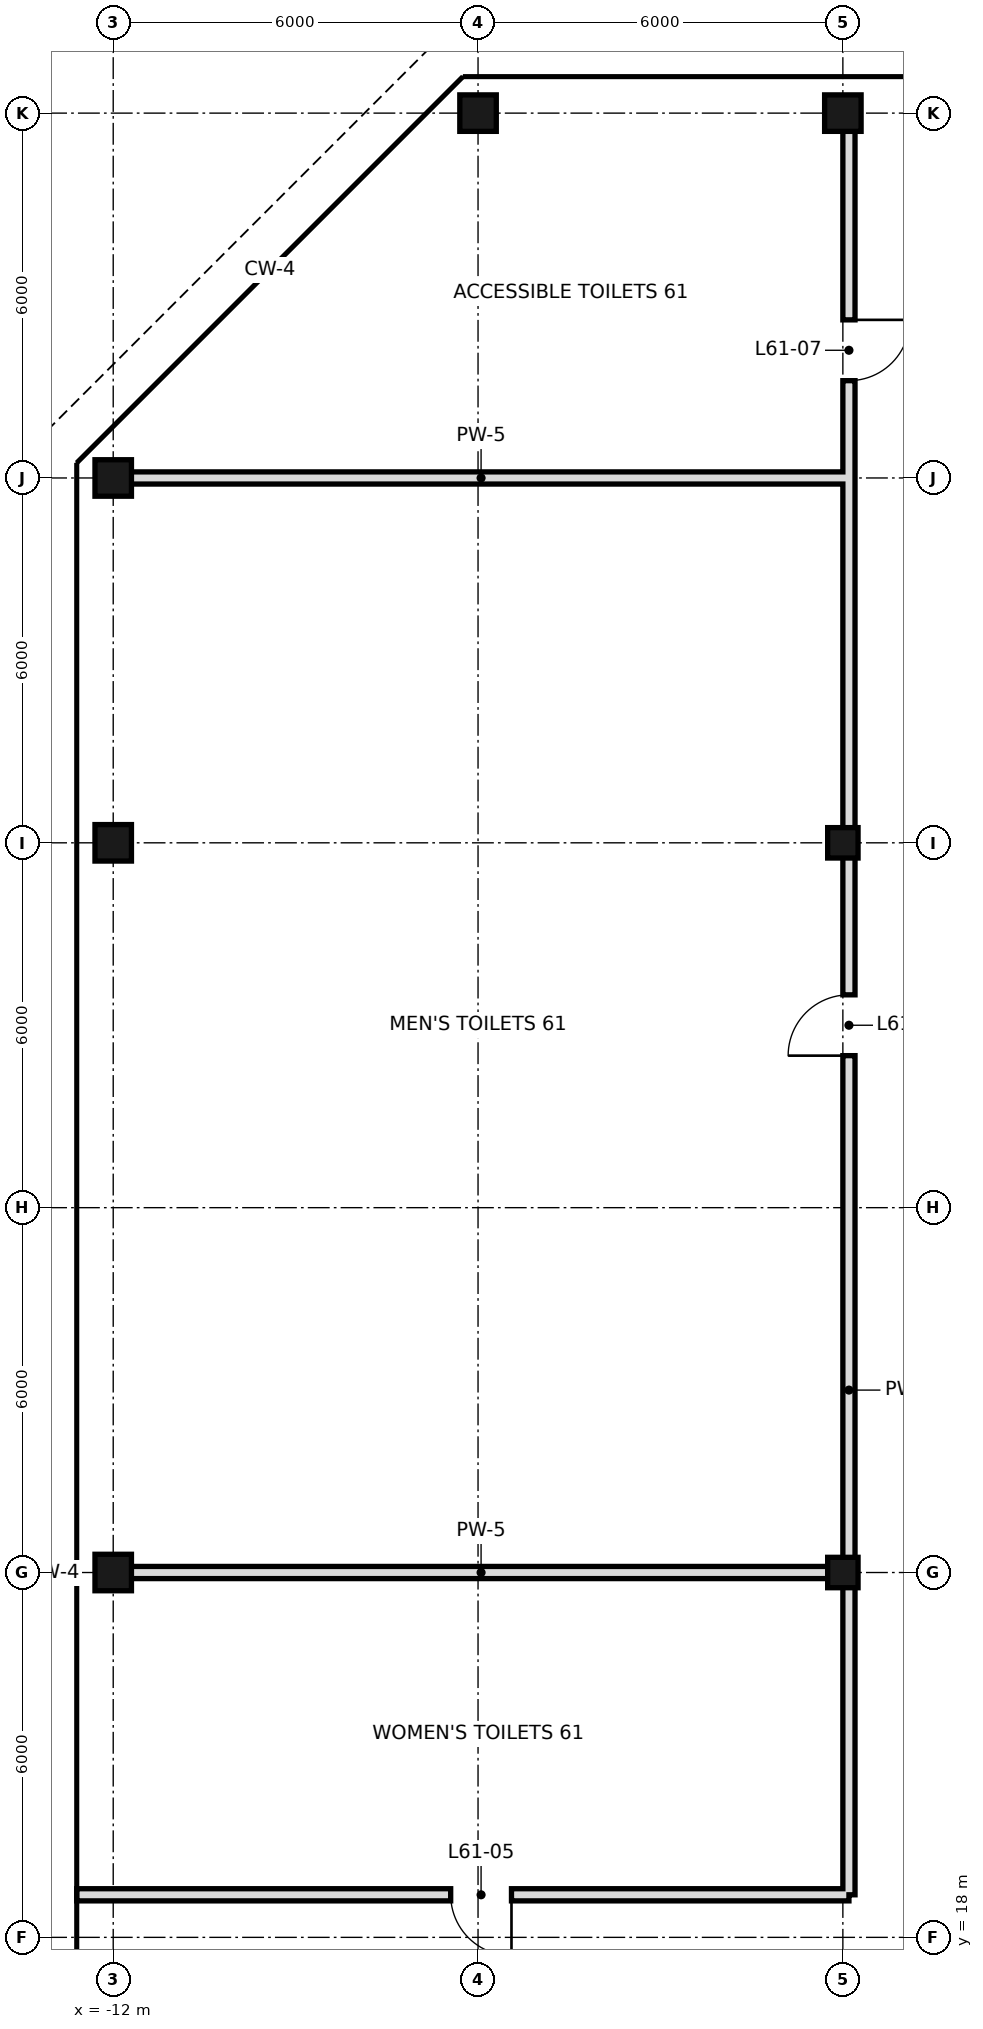
"""IFC4 building model, lengths in metres.
Left out: names, types, materials, properties, quantities, classifications, styles, units other than length and angle.
Written with IfcOpenShell. Run it as: python <this file> out.ifc"""

import sys

from ifc_helpers import new_model, si_unit, direction, frame, frame_2d, origin, origin_2d, place, context, subcontext, project, spatial, rectangle, hollow_rectangle, extrude, element, fill, save


model = new_model("IFC4")
c1 = context("Model", 3, precision=1e-05, world=origin(), true_north=direction((0.0, 1.0)))
c2 = subcontext(c1, "Body", "Model", "MODEL_VIEW")
j1 = project(units=[si_unit("LENGTHUNIT", "METRE"), si_unit("PLANEANGLEUNIT", "RADIAN")], contexts=[c1])
p1 = place(None, origin())
s1 = spatial("IfcSite", under=j1, at=p1, CompositionType="ELEMENT")
p2 = place(p1, origin())
s2 = spatial("IfcBuilding", under=s1, at=p2, CompositionType="ELEMENT")
p3 = place(p2, frame((0.0, 0.0, 257.6)))
s3 = spatial("IfcBuildingStorey", under=s2, at=p3, CompositionType="ELEMENT", Elevation=257.6)
for number, where, z_axis, x_axis in (
    (1, (-12.0, 24.0, 0.0), (0.0, 0.0, 1.0), (1.0, 0.0, 0.0)),
    (2, (-12.0, 36.0, 0.0), (0.0, 0.0, 1.0), (1.0, 0.0, 0.0)),
    (3, (-12.0, 42.0, 0.0), (0.0, 0.0, 1.0), (1.0, 0.0, 0.0)),
    (4, (-6.0, 48.0, 0.0), (0.0, 0.0, 1.0), (1.0, 0.0, 0.0)),
):
    element("IfcColumn", number, at=place(p3, frame(where, z_axis=z_axis, x_axis=x_axis)), inside=s3, PredefinedType="COLUMN", context=c2, shape_type="SweptSolid", body=[
        extrude(hollow_rectangle(XDim=0.6, YDim=0.6, WallThickness=0.028, at=origin_2d()), origin(), (0.0, 0.0, 1.0), 5.4),
    ])
for number, where, z_axis, x_axis in (
    (5, (0.0, 24.0, 0.0), (0.0, 0.0, 1.0), (1.0, 0.0, 0.0)),
    (6, (0.0, 36.0, 0.0), (0.0, 0.0, 1.0), (1.0, 0.0, 0.0)),
):
    element("IfcColumn", number, at=place(p3, frame(where, z_axis=z_axis, x_axis=x_axis)), inside=s3, PredefinedType="COLUMN", context=c2, shape_type="SweptSolid", body=[
        extrude(hollow_rectangle(XDim=0.5, YDim=0.5, WallThickness=0.025, at=origin_2d()), origin(), (0.0, 0.0, 1.0), 5.4),
    ])
p4 = place(p3, frame((0.0, 48.0, 0.0), z_axis=(0.0, 0.0, 1.0), x_axis=(1.0, 0.0, 0.0)))
e7 = element("IfcColumn", 7, at=p4, inside=s3, PredefinedType="COLUMN", context=c2, shape_type="SweptSolid", body=[
    extrude(hollow_rectangle(XDim=0.6, YDim=0.6, WallThickness=0.028, at=origin_2d()), origin(), (0.0, 0.0, 1.0), 5.4),
])
p5 = place(p3, frame((0.1, 18.7, 0.0), z_axis=(0.0, 0.0, 1.0), x_axis=(0.0, 1.0, 0.0)))
e8 = element("IfcWall", 8, at=p5, inside=s3, PredefinedType="SOLIDWALL", context=c2, shape_type="SweptSolid", body=[
    extrude(rectangle(XDim=29.3, YDim=0.2, at=frame_2d((14.65, 0.0))), origin(), (0.0, 0.0, 1.0), 4.52),
])
p6 = place(p5, frame((13.8, 0.0, 0.0)))
e9 = element("IfcOpeningElement", 9, at=p6, cuts=e8, PredefinedType="OPENING", context=c2, shape_type="SweptSolid", body=[
    extrude(rectangle(XDim=1.0, YDim=2.4, at=frame_2d((0.5, 1.2))), frame((0.0, 0.11, 0.0), z_axis=(0.0, -1.0, 0.0), x_axis=(1.0, 0.0, 0.0)), (0.0, 0.0, 1.0), 0.22),
])
p7 = place(p5, frame((24.9, 0.0, 0.0)))
e10 = element("IfcOpeningElement", 10, at=p7, cuts=e8, PredefinedType="OPENING", context=c2, shape_type="SweptSolid", body=[
    extrude(rectangle(XDim=1.0, YDim=2.4, at=frame_2d((0.5, 1.2))), frame((0.0, 0.11, 0.0), z_axis=(0.0, -1.0, 0.0), x_axis=(1.0, 0.0, 0.0)), (0.0, 0.0, 1.0), 0.22),
])
p8 = place(p3, frame((-12.6, 18.7, 0.0), z_axis=(0.0, 0.0, 1.0), x_axis=(1.0, 0.0, 0.0)))
e11 = element("IfcWall", 11, at=p8, inside=s3, PredefinedType="SOLIDWALL", context=c2, shape_type="SweptSolid", body=[
    extrude(rectangle(XDim=12.7, YDim=0.2, at=frame_2d((6.35, 0.0))), origin(), (0.0, 0.0, 1.0), 4.52),
])
p9 = place(p8, frame((6.15, 0.0, 0.0)))
e12 = element("IfcOpeningElement", 12, at=p9, cuts=e11, PredefinedType="OPENING", context=c2, shape_type="SweptSolid", body=[
    extrude(rectangle(XDim=1.0, YDim=2.4, at=frame_2d((0.5, 1.2))), frame((0.0, 0.11, 0.0), z_axis=(0.0, -1.0, 0.0), x_axis=(1.0, 0.0, 0.0)), (0.0, 0.0, 1.0), 0.22),
])
for number, where, z_axis, x_axis in (
    (13, (-12.0, 24.0, 0.0), (0.0, 0.0, 1.0), (1.0, 0.0, 0.0)),
    (14, (-12.0, 42.0, 0.0), (0.0, 0.0, 1.0), (1.0, 0.0, 0.0)),
):
    element("IfcWall", number, at=place(p3, frame(where, z_axis=z_axis, x_axis=x_axis)), inside=s3, PredefinedType="SOLIDWALL", context=c2, shape_type="SweptSolid", body=[
        extrude(rectangle(XDim=12.1, YDim=0.2, at=frame_2d((6.05, 0.0))), origin(), (0.0, 0.0, 1.0), 4.52),
    ])
p10 = place(p9, origin())
e15 = element("IfcDoor", 15, at=p10, inside=s3, OperationType="SINGLE_SWING_RIGHT", PredefinedType="DOOR", context=c2, shape_type="SweptSolid", body=[
    extrude(rectangle(XDim=1.0, YDim=2.4, at=frame_2d((0.5, 1.2))), frame((0.0, 0.025, 0.0), z_axis=(0.0, -1.0, 0.0), x_axis=(1.0, 0.0, 0.0)), (0.0, 0.0, 1.0), 0.05),
])
fill(e12, e15)
p11 = place(p6, origin())
e16 = element("IfcDoor", 16, at=p11, inside=s3, OperationType="SINGLE_SWING_LEFT", PredefinedType="DOOR", context=c2, shape_type="SweptSolid", body=[
    extrude(rectangle(XDim=1.0, YDim=2.4, at=frame_2d((0.5, 1.2))), frame((0.0, 0.025, 0.0), z_axis=(0.0, -1.0, 0.0), x_axis=(1.0, 0.0, 0.0)), (0.0, 0.0, 1.0), 0.05),
])
fill(e9, e16)
p12 = place(p7, origin())
e17 = element("IfcDoor", 17, at=p12, inside=s3, OperationType="SINGLE_SWING_RIGHT", PredefinedType="DOOR", context=c2, shape_type="SweptSolid", body=[
    extrude(rectangle(XDim=1.0, YDim=2.4, at=frame_2d((0.5, 1.2))), frame((0.0, 0.025, 0.0), z_axis=(0.0, -1.0, 0.0), x_axis=(1.0, 0.0, 0.0)), (0.0, 0.0, 1.0), 0.05),
])
fill(e10, e17)
save(model, sys.argv[1])
